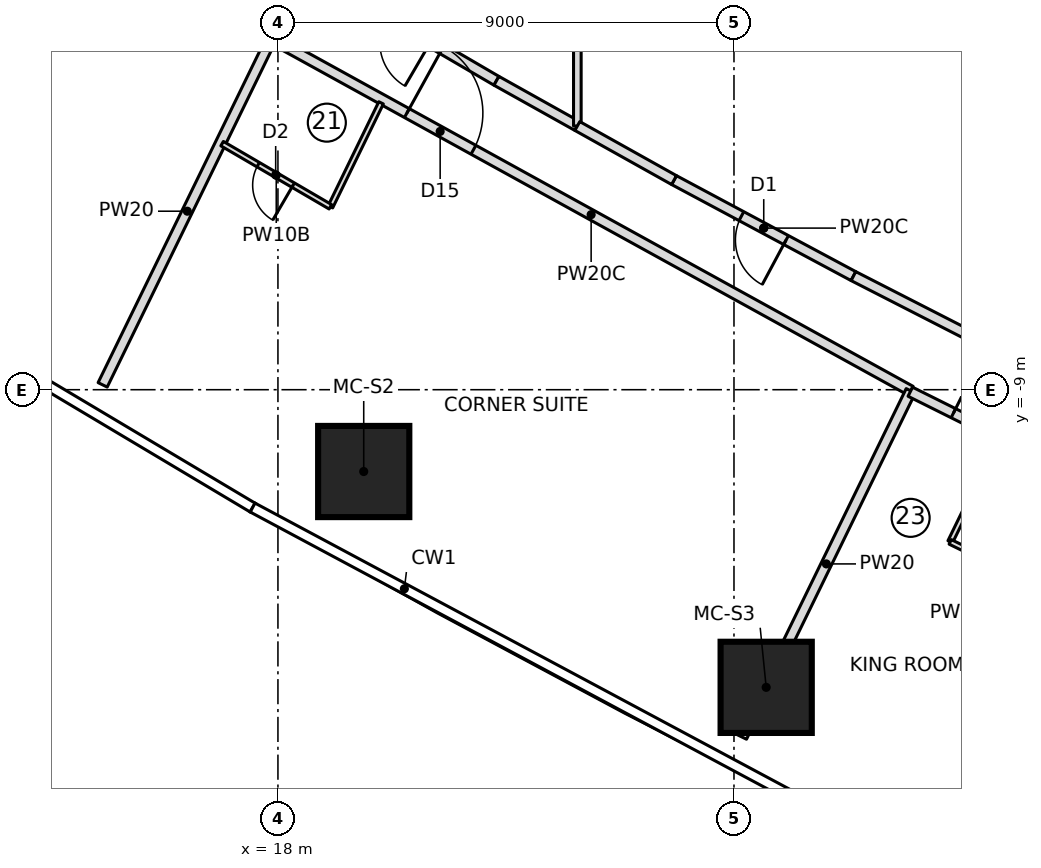
"""IFC4 building model, lengths in metres.
Left out: names, types, materials, properties, quantities, classifications, styles, units other than length and angle.
Written with IfcOpenShell. Run it as: python <this file> out.ifc"""

import sys

from ifc_helpers import new_model, si_unit, direction, frame, frame_2d, origin, origin_2d, place, context, subcontext, project, spatial, rectangle, extrude, element, fill, save


model = new_model("IFC4")
c1 = context("Model", 3, precision=1e-05, world=origin(), true_north=direction((0.0, 1.0)))
c2 = subcontext(c1, "Body", "Model", "MODEL_VIEW")
j1 = project(units=[si_unit("LENGTHUNIT", "METRE"), si_unit("PLANEANGLEUNIT", "RADIAN")], contexts=[c1])
p1 = place(None, origin())
s1 = spatial("IfcSite", under=j1, at=p1, CompositionType="ELEMENT")
p2 = place(p1, origin())
s2 = spatial("IfcBuilding", under=s1, at=p2, CompositionType="ELEMENT")
p3 = place(p2, frame((0.0, 0.0, 39.6)))
s3 = spatial("IfcBuildingStorey", under=s2, at=p3, CompositionType="ELEMENT", Elevation=39.6)
for number, where, z_axis, x_axis in (
    (1, (19.693, -10.615, 0.0), (0.0, 0.0, 1.0), (1.0, 0.0, 0.0)),
    (2, (27.635, -14.874, 0.0), (0.0, 0.0, 1.0), (1.0, 0.0, 0.0)),
):
    element("IfcColumn", number, at=place(p3, frame(where, z_axis=z_axis, x_axis=x_axis)), inside=s3, PredefinedType="COLUMN", context=c2, shape_type="SweptSolid", body=[
        extrude(rectangle(XDim=1.8, YDim=1.8, at=origin_2d()), origin(), (0.0, 0.0, 1.0), 3.55),
    ])
p4 = place(p3, frame((14.541, -8.904, 0.0), z_axis=(0.0, 0.0, 1.0), x_axis=(0.438213564788, 0.898870887078, 0.0)))
e3 = element("IfcWall", 3, at=p4, inside=s3, PredefinedType="PARTITIONING", context=c2, shape_type="SweptSolid", body=[
    extrude(rectangle(XDim=7.625, YDim=0.2, at=frame_2d((3.813, 0.0))), origin(), (0.0, 0.0, 1.0), 3.25),
])
p5 = place(p3, frame((17.874, -2.068, 0.0), z_axis=(0.0, 0.0, 1.0), x_axis=(0.875757832755, -0.482750679305, 0.0)))
e4 = element("IfcWall", 4, at=p5, inside=s3, PredefinedType="PARTITIONING", context=c2, shape_type="SweptSolid", body=[
    extrude(rectangle(XDim=14.405, YDim=0.2, at=frame_2d((7.202, 0.0))), origin(), (0.0, 0.0, 1.0), 3.25),
])
p6 = place(p5, frame((3.05, 0.0, 0.0)))
e5 = element("IfcOpeningElement", 5, at=p6, cuts=e4, PredefinedType="OPENING", context=c2, shape_type="SweptSolid", body=[
    extrude(rectangle(XDim=1.5, YDim=2.1, at=frame_2d((0.75, 1.05))), frame((0.0, 0.11, 0.0), z_axis=(0.0, -1.0, 0.0), x_axis=(1.0, 0.0, 0.0)), (0.0, 0.0, 1.0), 0.22),
])
p7 = place(p3, frame((20.035, -3.338, 0.0), z_axis=(0.0, 0.0, 1.0), x_axis=(-0.438122322582, -0.898915363344, 0.0)))
e6 = element("IfcWall", 6, at=p7, inside=s3, PredefinedType="PARTITIONING", context=c2, shape_type="SweptSolid", body=[
    extrude(rectangle(XDim=2.283, YDim=0.1, at=frame_2d((1.142, 0.0))), origin(), (0.0, 0.0, 1.0), 3.25),
])
p8 = place(p3, frame((19.035, -5.39, 0.0), z_axis=(0.0, 0.0, 1.0), x_axis=(-0.863707305865, 0.503993739837, 0.0)))
e7 = element("IfcWall", 7, at=p8, inside=s3, PredefinedType="PARTITIONING", context=c2, shape_type="SweptSolid", body=[
    extrude(rectangle(XDim=2.474, YDim=0.1, at=frame_2d((1.237, 0.0))), origin(), (0.0, 0.0, 1.0), 3.25),
])
p9 = place(p8, frame((0.85, 0.0, 0.0)))
e8 = element("IfcOpeningElement", 8, at=p9, cuts=e7, PredefinedType="OPENING", context=c2, shape_type="SweptSolid", body=[
    extrude(rectangle(XDim=0.8, YDim=2.1, at=frame_2d((0.4, 1.05))), frame((0.0, 0.06, 0.0), z_axis=(0.0, -1.0, 0.0), x_axis=(1.0, 0.0, 0.0)), (0.0, 0.0, 1.0), 0.12),
])
p10 = place(p3, frame((27.157, -15.854, 0.0), z_axis=(0.0, 0.0, 1.0), x_axis=(0.43822365664, 0.898865967072, 0.0)))
e9 = element("IfcWall", 9, at=p10, inside=s3, PredefinedType="PARTITIONING", context=c2, shape_type="SweptSolid", body=[
    extrude(rectangle(XDim=7.601, YDim=0.2, at=frame_2d((3.801, 0.0))), origin(), (0.0, 0.0, 1.0), 3.25),
])
p11 = place(p3, frame((30.48, -9.04, 0.0), z_axis=(0.0, 0.0, 1.0), x_axis=(0.894989913054, -0.446086376761, 0.0)))
e10 = element("IfcWall", 10, at=p11, inside=s3, PredefinedType="PARTITIONING", context=c2, shape_type="SweptSolid", body=[
    extrude(rectangle(XDim=4.506, YDim=0.2, at=frame_2d((2.253, 0.0))), origin(), (0.0, 0.0, 1.0), 3.25),
])
p12 = place(p11, frame((0.95, 0.0, 0.0)))
e11 = element("IfcOpeningElement", 11, at=p12, cuts=e10, PredefinedType="OPENING", context=c2, shape_type="SweptSolid", body=[
    extrude(rectangle(XDim=1.0, YDim=2.1, at=frame_2d((0.5, 1.05))), frame((0.0, 0.11, 0.0), z_axis=(0.0, -1.0, 0.0), x_axis=(1.0, 0.0, 0.0)), (0.0, 0.0, 1.0), 0.22),
])
p13 = place(p3, frame((31.267, -12.003, 0.0), z_axis=(0.0, 0.0, 1.0), x_axis=(0.438136931394, 0.898908243008, 0.0)))
e12 = element("IfcWall", 12, at=p13, inside=s3, PredefinedType="PARTITIONING", context=c2, shape_type="SweptSolid", body=[
    extrude(rectangle(XDim=1.51, YDim=0.1, at=frame_2d((0.755, 0.0))), origin(), (0.0, 0.0, 1.0), 3.25),
])
p14 = place(p3, frame((33.513, -13.101, 0.0), z_axis=(0.0, 0.0, 1.0), x_axis=(-0.89845285455, 0.439070003702, 0.0)))
e13 = element("IfcWall", 13, at=p14, inside=s3, PredefinedType="PARTITIONING", context=c2, shape_type="SweptSolid", body=[
    extrude(rectangle(XDim=2.5, YDim=0.1, at=frame_2d((1.25, 0.0))), origin(), (0.0, 0.0, 1.0), 3.25),
])
p15 = place(p14, frame((0.85, 0.0, 0.0)))
e14 = element("IfcOpeningElement", 14, at=p15, cuts=e13, PredefinedType="OPENING", context=c2, shape_type="SweptSolid", body=[
    extrude(rectangle(XDim=0.8, YDim=2.1, at=frame_2d((0.4, 1.05))), frame((0.0, 0.06, 0.0), z_axis=(0.0, -1.0, 0.0), x_axis=(1.0, 0.0, 0.0)), (0.0, 0.0, 1.0), 0.12),
])
p16 = place(p3, frame((31.191, -17.865, 0.0), z_axis=(0.0, 0.0, 1.0), x_axis=(0.438187612283, 0.898883538865, 0.0)))
e15 = element("IfcWall", 15, at=p16, inside=s3, PredefinedType="PARTITIONING", context=c2, shape_type="SweptSolid", body=[
    extrude(rectangle(XDim=7.582, YDim=0.2, at=frame_2d((3.791, 0.0))), origin(), (0.0, 0.0, 1.0), 3.25),
])
p17 = place(p3, frame((22.312, -2.903, 0.0), z_axis=(0.0, 0.0, 1.0), x_axis=(-0.863710538269, 0.503988200341, 0.0)))
e16 = element("IfcWall", 16, at=p17, inside=s3, PredefinedType="PARTITIONING", context=c2, shape_type="SweptSolid", body=[
    extrude(rectangle(XDim=4.016, YDim=0.2, at=frame_2d((2.008, 0.0))), origin(), (0.0, 0.0, 1.0), 3.25),
])
p18 = place(p17, frame((1.508, 0.0, 0.0)))
e17 = element("IfcOpeningElement", 17, at=p18, cuts=e16, PredefinedType="OPENING", context=c2, shape_type="SweptSolid", body=[
    extrude(rectangle(XDim=1.0, YDim=2.1, at=frame_2d((0.5, 1.05))), frame((0.0, 0.11, 0.0), z_axis=(0.0, -1.0, 0.0), x_axis=(1.0, 0.0, 0.0)), (0.0, 0.0, 1.0), 0.22),
])
p19 = place(p3, frame((23.909, -3.796, 0.0), z_axis=(0.0, 0.0, 1.0), x_axis=(-0.872813072418, 0.48805464921, 0.0)))
e18 = element("IfcWall", 18, at=p19, inside=s3, PredefinedType="PARTITIONING", context=c2, shape_type="SweptSolid", body=[
    extrude(rectangle(XDim=1.829, YDim=0.2, at=frame_2d((0.915, 0.0))), origin(), (0.0, 0.0, 1.0), 3.25),
])
p20 = place(p3, frame((23.909, -3.796, 0.0), z_axis=(0.0, 0.0, 1.0), x_axis=(0.0, 1.0, 0.0)))
e19 = element("IfcWall", 19, at=p20, inside=s3, PredefinedType="PARTITIONING", context=c2, shape_type="SweptSolid", body=[
    extrude(rectangle(XDim=7.592, YDim=0.15, at=frame_2d((3.796, 0.0))), origin(), (0.0, 0.0, 1.0), 3.25),
])
p21 = place(p3, frame((29.357, -6.758, 0.0), z_axis=(0.0, 0.0, 1.0), x_axis=(-0.881655245922, 0.471894084874, 0.0)))
e20 = element("IfcWall", 20, at=p21, inside=s3, PredefinedType="PARTITIONING", context=c2, shape_type="SweptSolid", body=[
    extrude(rectangle(XDim=4.016, YDim=0.2, at=frame_2d((2.008, 0.0))), origin(), (0.0, 0.0, 1.0), 3.25),
])
p22 = place(p21, frame((1.508, 0.0, 0.0)))
e21 = element("IfcOpeningElement", 21, at=p22, cuts=e20, PredefinedType="OPENING", context=c2, shape_type="SweptSolid", body=[
    extrude(rectangle(XDim=1.0, YDim=2.1, at=frame_2d((0.5, 1.05))), frame((0.0, 0.11, 0.0), z_axis=(0.0, -1.0, 0.0), x_axis=(1.0, 0.0, 0.0)), (0.0, 0.0, 1.0), 0.22),
])
p23 = place(p3, frame((31.95, -8.085, 0.0), z_axis=(0.0, 0.0, 1.0), x_axis=(-0.890213377055, 0.455543788579, 0.0)))
e22 = element("IfcWall", 22, at=p23, inside=s3, PredefinedType="PARTITIONING", context=c2, shape_type="SweptSolid", body=[
    extrude(rectangle(XDim=2.912, YDim=0.2, at=frame_2d((1.456, 0.0))), origin(), (0.0, 0.0, 1.0), 3.25),
])
p24 = place(p3, frame((25.817, -4.863, 0.0), z_axis=(0.0, 0.0, 1.0), x_axis=(-0.872789592901, 0.48809663646, 0.0)))
e23 = element("IfcWall", 23, at=p24, inside=s3, PredefinedType="PARTITIONING", context=c2, shape_type="SweptSolid", body=[
    extrude(rectangle(XDim=2.186, YDim=0.2, at=frame_2d((1.093, 0.0))), origin(), (0.0, 0.0, 1.0), 3.25),
])
p25 = place(p9, origin())
e24 = element("IfcDoor", 24, at=p25, inside=s3, OperationType="SINGLE_SWING_LEFT", PredefinedType="DOOR", context=c2, shape_type="SweptSolid", body=[
    extrude(rectangle(XDim=0.8, YDim=2.1, at=frame_2d((0.4, 1.05))), frame((0.0, 0.025, 0.0), z_axis=(0.0, -1.0, 0.0), x_axis=(1.0, 0.0, 0.0)), (0.0, 0.0, 1.0), 0.05),
])
fill(e8, e24)
p26 = place(p6, origin())
e25 = element("IfcDoor", 25, at=p26, inside=s3, OperationType="DOUBLE_DOOR_SINGLE_SWING", PredefinedType="DOOR", context=c2, shape_type="SweptSolid", body=[
    extrude(rectangle(XDim=1.5, YDim=2.1, at=frame_2d((0.75, 1.05))), frame((0.0, 0.025, 0.0), z_axis=(0.0, -1.0, 0.0), x_axis=(1.0, 0.0, 0.0)), (0.0, 0.0, 1.0), 0.05),
])
fill(e5, e25)
p27 = place(p12, origin())
e26 = element("IfcDoor", 26, at=p27, inside=s3, OperationType="SINGLE_SWING_LEFT", PredefinedType="DOOR", context=c2, shape_type="SweptSolid", body=[
    extrude(rectangle(XDim=1.0, YDim=2.1, at=frame_2d((0.5, 1.05))), frame((0.0, 0.025, 0.0), z_axis=(0.0, -1.0, 0.0), x_axis=(1.0, 0.0, 0.0)), (0.0, 0.0, 1.0), 0.05),
])
fill(e11, e26)
p28 = place(p22, origin())
e27 = element("IfcDoor", 27, at=p28, inside=s3, OperationType="SINGLE_SWING_LEFT", PredefinedType="DOOR", context=c2, shape_type="SweptSolid", body=[
    extrude(rectangle(XDim=1.0, YDim=2.1, at=frame_2d((0.5, 1.05))), frame((0.0, 0.025, 0.0), z_axis=(0.0, -1.0, 0.0), x_axis=(1.0, 0.0, 0.0)), (0.0, 0.0, 1.0), 0.05),
])
fill(e21, e27)
save(model, sys.argv[1])
